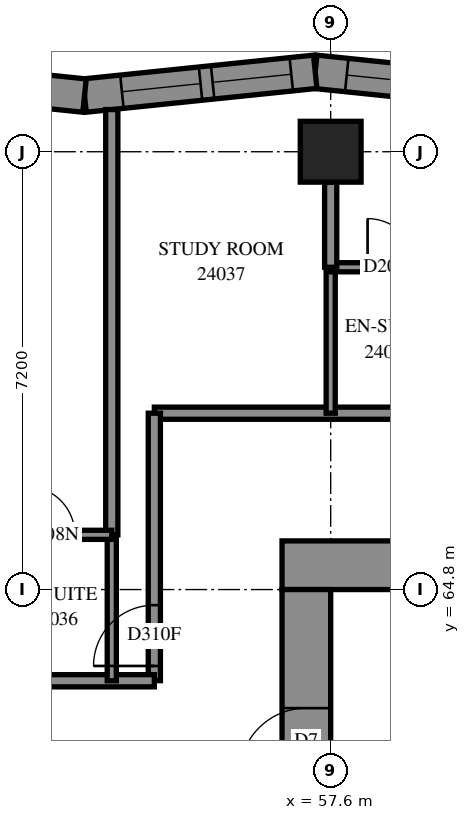
"""IFC4 building model, lengths in metres.
Left out: names, types, materials, properties, quantities, classifications, styles, units other than length and angle.
Written with IfcOpenShell. Run it as: python <this file> out.ifc"""

import sys

from ifc_helpers import new_model, si_unit, direction, frame, frame_2d, origin, origin_2d, place, context, subcontext, project, spatial, polyline, rectangle, outline, extrude, element, fill, save


model = new_model("IFC4")
c1 = context("Model", 3, precision=1e-05, world=origin(), true_north=direction((0.0, 1.0)))
c2 = subcontext(c1, "Body", "Model", "MODEL_VIEW")
j1 = project(units=[si_unit("LENGTHUNIT", "METRE"), si_unit("PLANEANGLEUNIT", "RADIAN")], contexts=[c1])
p1 = place(None, origin())
s1 = spatial("IfcSite", under=j1, at=p1, CompositionType="ELEMENT")
p2 = place(p1, origin())
s2 = spatial("IfcBuilding", under=s1, at=p2, CompositionType="ELEMENT")
p3 = place(p2, frame((0.0, 0.0, 91.4)))
s3 = spatial("IfcBuildingStorey", under=s2, at=p3, CompositionType="ELEMENT", Elevation=91.4)
p4 = place(p3, frame((57.6, 72.0, 0.0), z_axis=(0.0, 0.0, 1.0), x_axis=(1.0, 0.0, 0.0)))
e1 = element("IfcColumn", 1, at=p4, inside=s3, PredefinedType="COLUMN", context=c2, shape_type="SweptSolid", body=[
    extrude(rectangle(XDim=1.0, YDim=1.0, at=origin_2d()), origin(), (0.0, 0.0, 1.0), 3.1),
])
p5 = place(p3, frame((56.8, 65.2, -0.3), z_axis=(0.0, 0.0, 1.0), x_axis=(1.0, 0.0, 0.0)))
e2 = element("IfcWall", 2, at=p5, inside=s3, PredefinedType="SHEAR", context=c2, shape_type="SweptSolid", body=[
    extrude(rectangle(XDim=16.0, YDim=0.8, at=frame_2d((8.0, 0.0))), origin(), (0.0, 0.0, 1.0), 2.7),
])
p6 = place(p5, frame((10.8, 0.0, 0.3)))
e3 = element("IfcOpeningElement", 3, at=p6, cuts=e2, PredefinedType="OPENING", context=c2, shape_type="SweptSolid", body=[
    extrude(rectangle(XDim=0.8, YDim=2.1, at=frame_2d((0.4, 1.05))), frame((0.0, 0.41, 0.0), z_axis=(0.0, -1.0, 0.0), x_axis=(1.0, 0.0, 0.0)), (0.0, 0.0, 1.0), 0.82),
])
p7 = place(p3, frame((57.2, 50.4, -0.3), z_axis=(0.0, 0.0, 1.0), x_axis=(0.0, 1.0, 0.0)))
e4 = element("IfcWall", 4, at=p7, inside=s3, PredefinedType="SHEAR", context=c2, shape_type="SweptSolid", body=[
    extrude(rectangle(XDim=14.4, YDim=0.8, at=frame_2d((7.2, 0.0))), origin(), (0.0, 0.0, 1.0), 2.7),
])
p8 = place(p7, frame((4.55, 0.0, 0.3)))
e5 = element("IfcOpeningElement", 5, at=p8, cuts=e4, PredefinedType="OPENING", context=c2, shape_type="SweptSolid", body=[
    extrude(rectangle(XDim=1.1, YDim=2.1, at=frame_2d((0.55, 1.05))), frame((0.0, 0.41, 0.0), z_axis=(0.0, -1.0, 0.0), x_axis=(1.0, 0.0, 0.0)), (0.0, 0.0, 1.0), 0.82),
])
p9 = place(p7, frame((11.35, 0.0, 0.3)))
e6 = element("IfcOpeningElement", 6, at=p9, cuts=e4, PredefinedType="OPENING", context=c2, shape_type="SweptSolid", body=[
    extrude(rectangle(XDim=1.1, YDim=2.1, at=frame_2d((0.55, 1.05))), frame((0.0, 0.41, 0.0), z_axis=(0.0, -1.0, 0.0), x_axis=(1.0, 0.0, 0.0)), (0.0, 0.0, 1.0), 0.82),
])
p10 = place(p3, frame((61.139, 72.924, 0.0), z_axis=(0.0, 0.0, 1.0), x_axis=(-0.9947306832, 0.1025225234, 0.0)))
e7 = element("IfcWall", 7, at=p10, inside=s3, PredefinedType="SOLIDWALL", context=c2, shape_type="SweptSolid", body=[
    extrude(outline(polyline([(0.028, -0.275), (3.842, -0.275), (3.785, 0.275), (-0.028, 0.275), (0.028, -0.275)])), origin(), (0.0, 0.0, 1.0), 3.1),
])
p11 = place(p10, frame((0.493, 0.0, 0.5)))
e8 = element("IfcOpeningElement", 8, at=p11, cuts=e7, PredefinedType="OPENING", context=c2, shape_type="SweptSolid", body=[
    extrude(rectangle(XDim=1.3, YDim=2.45, at=frame_2d((0.65, 1.225))), frame((0.0, 0.285, 0.0), z_axis=(0.0, -1.0, 0.0), x_axis=(1.0, 0.0, 0.0)), (0.0, 0.0, 1.0), 0.57),
])
p12 = place(p10, frame((1.993, 0.0, 0.5)))
e9 = element("IfcOpeningElement", 9, at=p12, cuts=e7, PredefinedType="OPENING", context=c2, shape_type="SweptSolid", body=[
    extrude(rectangle(XDim=1.3, YDim=2.45, at=frame_2d((0.65, 1.225))), frame((0.0, 0.285, 0.0), z_axis=(0.0, -1.0, 0.0), x_axis=(1.0, 0.0, 0.0)), (0.0, 0.0, 1.0), 0.57),
])
p13 = place(p3, frame((57.346, 73.314, 0.0), z_axis=(0.0, 0.0, 1.0), x_axis=(-0.9947304076, -0.1025251975, 0.0)))
e10 = element("IfcWall", 10, at=p13, inside=s3, PredefinedType="SOLIDWALL", context=c2, shape_type="SweptSolid", body=[
    extrude(outline(polyline([(-0.028, -0.275), (3.785, -0.275), (3.842, 0.275), (0.028, 0.275), (-0.028, -0.275)])), origin(), (0.0, 0.0, 1.0), 3.1),
])
p14 = place(p13, frame((0.396, 0.0, 0.5)))
e11 = element("IfcOpeningElement", 11, at=p14, cuts=e10, PredefinedType="OPENING", context=c2, shape_type="SweptSolid", body=[
    extrude(rectangle(XDim=1.3, YDim=2.45, at=frame_2d((0.65, 1.225))), frame((0.0, 0.285, 0.0), z_axis=(0.0, -1.0, 0.0), x_axis=(1.0, 0.0, 0.0)), (0.0, 0.0, 1.0), 0.57),
])
p15 = place(p13, frame((1.896, 0.0, 0.5)))
e12 = element("IfcOpeningElement", 12, at=p15, cuts=e10, PredefinedType="OPENING", context=c2, shape_type="SweptSolid", body=[
    extrude(rectangle(XDim=1.3, YDim=2.45, at=frame_2d((0.65, 1.225))), frame((0.0, 0.285, 0.0), z_axis=(0.0, -1.0, 0.0), x_axis=(1.0, 0.0, 0.0)), (0.0, 0.0, 1.0), 0.57),
])
p16 = place(p3, frame((53.552, 72.924, 0.0), z_axis=(0.0, 0.0, 1.0), x_axis=(-0.9947306832, 0.1025225234, 0.0)))
e13 = element("IfcWall", 13, at=p16, inside=s3, PredefinedType="SOLIDWALL", context=c2, shape_type="SweptSolid", body=[
    extrude(outline(polyline([(0.028, -0.275), (3.842, -0.275), (3.785, 0.275), (-0.028, 0.275), (0.028, -0.275)])), origin(), (0.0, 0.0, 1.0), 3.1),
])
p17 = place(p16, frame((1.084, 0.0, 0.5)))
e14 = element("IfcOpeningElement", 14, at=p17, cuts=e13, PredefinedType="OPENING", context=c2, shape_type="SweptSolid", body=[
    extrude(rectangle(XDim=1.2, YDim=2.45, at=frame_2d((0.6, 1.225))), frame((0.0, 0.285, 0.0), z_axis=(0.0, -1.0, 0.0), x_axis=(1.0, 0.0, 0.0)), (0.0, 0.0, 1.0), 0.57),
])
p18 = place(p3, frame((54.7, 67.7, 0.0), z_axis=(0.0, 0.0, 1.0), x_axis=(1.0, 0.0, 0.0)))
e15 = element("IfcWall", 15, at=p18, inside=s3, PredefinedType="PARTITIONING", context=c2, shape_type="SweptSolid", body=[
    extrude(rectangle(XDim=20.2, YDim=0.2, at=frame_2d((10.1, 0.0))), origin(), (0.0, 0.0, 1.0), 3.1),
])
p19 = place(p18, frame((5.25, 0.0, 0.0)))
e16 = element("IfcOpeningElement", 16, at=p19, cuts=e15, PredefinedType="OPENING", context=c2, shape_type="SweptSolid", body=[
    extrude(rectangle(XDim=0.9, YDim=2.1, at=frame_2d((0.45, 1.05))), frame((0.0, 0.11, 0.0), z_axis=(0.0, -1.0, 0.0), x_axis=(1.0, 0.0, 0.0)), (0.0, 0.0, 1.0), 0.22),
])
p20 = place(p18, frame((6.9, 0.0, 0.0)))
e17 = element("IfcOpeningElement", 17, at=p20, cuts=e15, PredefinedType="OPENING", context=c2, shape_type="SweptSolid", body=[
    extrude(rectangle(XDim=0.9, YDim=2.1, at=frame_2d((0.45, 1.05))), frame((0.0, 0.11, 0.0), z_axis=(0.0, -1.0, 0.0), x_axis=(1.0, 0.0, 0.0)), (0.0, 0.0, 1.0), 0.22),
])
p21 = place(p18, frame((12.45, 0.0, 0.0)))
e18 = element("IfcOpeningElement", 18, at=p21, cuts=e15, PredefinedType="OPENING", context=c2, shape_type="SweptSolid", body=[
    extrude(rectangle(XDim=0.9, YDim=2.1, at=frame_2d((0.45, 1.05))), frame((0.0, 0.11, 0.0), z_axis=(0.0, -1.0, 0.0), x_axis=(1.0, 0.0, 0.0)), (0.0, 0.0, 1.0), 0.22),
])
p22 = place(p18, frame((14.1, 0.0, 0.0)))
e19 = element("IfcOpeningElement", 19, at=p22, cuts=e15, PredefinedType="OPENING", context=c2, shape_type="SweptSolid", body=[
    extrude(rectangle(XDim=0.9, YDim=2.1, at=frame_2d((0.45, 1.05))), frame((0.0, 0.11, 0.0), z_axis=(0.0, -1.0, 0.0), x_axis=(1.0, 0.0, 0.0)), (0.0, 0.0, 1.0), 0.22),
])
p23 = place(p3, frame((54.0, 65.7, 0.0), z_axis=(0.0, 0.0, 1.0), x_axis=(0.0, 1.0, 0.0)))
e20 = element("IfcWall", 20, at=p23, inside=s3, PredefinedType="PARTITIONING", context=c2, shape_type="SweptSolid", body=[
    extrude(rectangle(XDim=6.993, YDim=0.2, at=frame_2d((3.497, 0.0))), origin(), (0.0, 0.0, 1.0), 3.1),
])
p24 = place(p3, frame((54.7, 63.302, 0.0), z_axis=(0.0, 0.0, 1.0), x_axis=(0.0, 1.0, 0.0)))
e21 = element("IfcWall", 21, at=p24, inside=s3, PredefinedType="PARTITIONING", context=c2, shape_type="SweptSolid", body=[
    extrude(rectangle(XDim=4.398, YDim=0.2, at=frame_2d((2.199, 0.0))), origin(), (0.0, 0.0, 1.0), 3.1),
])
p25 = place(p24, frame((0.242, 0.0, 0.0)))
e22 = element("IfcOpeningElement", 22, at=p25, cuts=e21, PredefinedType="OPENING", context=c2, shape_type="SweptSolid", body=[
    extrude(rectangle(XDim=1.0, YDim=2.1, at=frame_2d((0.5, 1.05))), frame((0.0, 0.11, 0.0), z_axis=(0.0, -1.0, 0.0), x_axis=(1.0, 0.0, 0.0)), (0.0, 0.0, 1.0), 0.22),
])
p26 = place(p3, frame((50.4, 63.3, 0.0), z_axis=(0.0, 0.0, 1.0), x_axis=(1.0, 0.0, 0.0)))
e23 = element("IfcWall", 23, at=p26, inside=s3, PredefinedType="PARTITIONING", context=c2, shape_type="SweptSolid", body=[
    extrude(rectangle(XDim=4.3, YDim=0.2, at=frame_2d((2.15, 0.0))), origin(), (0.0, 0.0, 1.0), 3.1),
])
p27 = place(p26, frame((0.552, 0.0, 0.0)))
e24 = element("IfcOpeningElement", 24, at=p27, cuts=e23, PredefinedType="OPENING", context=c2, shape_type="SweptSolid", body=[
    extrude(rectangle(XDim=0.9, YDim=2.1, at=frame_2d((0.45, 1.05))), frame((0.0, 0.11, 0.0), z_axis=(0.0, -1.0, 0.0), x_axis=(1.0, 0.0, 0.0)), (0.0, 0.0, 1.0), 0.22),
])
for number, where, z_axis, x_axis in (
    (25, (54.0, 63.3, 0.0), (0.0, 0.0, 1.0), (0.0, 1.0, 0.0)),
    (26, (57.6, 67.7, 0.0), (0.0, 0.0, 1.0), (0.0, 1.0, 0.0)),
):
    element("IfcWall", number, at=place(p3, frame(where, z_axis=z_axis, x_axis=x_axis)), inside=s3, PredefinedType="PARTITIONING", context=c2, shape_type="SweptSolid", body=[
        extrude(rectangle(XDim=2.4, YDim=0.15, at=frame_2d((1.2, 0.0))), origin(), (0.0, 0.0, 1.0), 3.1),
    ])
p28 = place(p3, frame((52.1, 65.7, 0.0), z_axis=(0.0, 0.0, 1.0), x_axis=(1.0, 0.0, 0.0)))
e27 = element("IfcWall", 27, at=p28, inside=s3, PredefinedType="PARTITIONING", context=c2, shape_type="SweptSolid", body=[
    extrude(rectangle(XDim=1.9, YDim=0.15, at=frame_2d((0.95, 0.0))), origin(), (0.0, 0.0, 1.0), 3.1),
])
p29 = place(p28, frame((0.493, 0.0, 0.0)))
e28 = element("IfcOpeningElement", 28, at=p29, cuts=e27, PredefinedType="OPENING", context=c2, shape_type="SweptSolid", body=[
    extrude(rectangle(XDim=0.8, YDim=2.1, at=frame_2d((0.4, 1.05))), frame((0.0, 0.085, 0.0), z_axis=(0.0, -1.0, 0.0), x_axis=(1.0, 0.0, 0.0)), (0.0, 0.0, 1.0), 0.17),
])
p30 = place(p3, frame((57.6, 70.1, 0.0), z_axis=(0.0, 0.0, 1.0), x_axis=(1.0, 0.0, 0.0)))
e29 = element("IfcWall", 29, at=p30, inside=s3, PredefinedType="PARTITIONING", context=c2, shape_type="SweptSolid", body=[
    extrude(rectangle(XDim=1.9, YDim=0.15, at=frame_2d((0.95, 0.0))), origin(), (0.0, 0.0, 1.0), 3.1),
])
p31 = place(p30, frame((0.607, 0.0, 0.0)))
e30 = element("IfcOpeningElement", 30, at=p31, cuts=e29, PredefinedType="OPENING", context=c2, shape_type="SweptSolid", body=[
    extrude(rectangle(XDim=0.8, YDim=2.1, at=frame_2d((0.4, 1.05))), frame((0.0, 0.085, 0.0), z_axis=(0.0, -1.0, 0.0), x_axis=(1.0, 0.0, 0.0)), (0.0, 0.0, 1.0), 0.17),
])
p32 = place(p3, frame((57.6, 70.1, 0.0), z_axis=(0.0, 0.0, 1.0), x_axis=(0.0, 1.0, 0.0)))
e31 = element("IfcWall", 31, at=p32, inside=s3, PredefinedType="PARTITIONING", context=c2, shape_type="SweptSolid", body=[
    extrude(rectangle(XDim=1.4, YDim=0.2, at=frame_2d((0.7, 0.0))), origin(), (0.0, 0.0, 1.0), 3.1),
])
p33 = place(p12, origin())
e32 = element("IfcWindow", 32, at=p33, inside=s3, PartitioningType="SINGLE_PANEL", PredefinedType="WINDOW", context=c2, shape_type="SweptSolid", body=[
    extrude(rectangle(XDim=1.3, YDim=2.45, at=frame_2d((0.65, 1.225))), frame((0.0, 0.155, 0.0), z_axis=(0.0, -1.0, 0.0), x_axis=(1.0, 0.0, 0.0)), (0.0, 0.0, 1.0), 0.06),
])
fill(e9, e32)
p34 = place(p14, origin())
e33 = element("IfcWindow", 33, at=p34, inside=s3, PartitioningType="SINGLE_PANEL", PredefinedType="WINDOW", context=c2, shape_type="SweptSolid", body=[
    extrude(rectangle(XDim=1.3, YDim=2.45, at=frame_2d((0.65, 1.225))), frame((0.0, 0.155, 0.0), z_axis=(0.0, -1.0, 0.0), x_axis=(1.0, 0.0, 0.0)), (0.0, 0.0, 1.0), 0.06),
])
fill(e11, e33)
p35 = place(p15, origin())
e34 = element("IfcWindow", 34, at=p35, inside=s3, PartitioningType="SINGLE_PANEL", PredefinedType="WINDOW", context=c2, shape_type="SweptSolid", body=[
    extrude(rectangle(XDim=1.3, YDim=2.45, at=frame_2d((0.65, 1.225))), frame((0.0, 0.155, 0.0), z_axis=(0.0, -1.0, 0.0), x_axis=(1.0, 0.0, 0.0)), (0.0, 0.0, 1.0), 0.06),
])
fill(e12, e34)
p36 = place(p9, origin())
e35 = element("IfcDoor", 35, at=p36, inside=s3, OperationType="SINGLE_SWING_LEFT", PredefinedType="DOOR", context=c2, shape_type="SweptSolid", body=[
    extrude(rectangle(XDim=1.1, YDim=2.1, at=frame_2d((0.55, 1.05))), frame((0.0, 0.025, 0.0), z_axis=(0.0, -1.0, 0.0), x_axis=(1.0, 0.0, 0.0)), (0.0, 0.0, 1.0), 0.05),
])
fill(e6, e35)
p37 = place(p29, origin())
e36 = element("IfcDoor", 36, at=p37, inside=s3, OperationType="SINGLE_SWING_RIGHT", PredefinedType="DOOR", context=c2, shape_type="SweptSolid", body=[
    extrude(rectangle(XDim=0.8, YDim=2.1, at=frame_2d((0.4, 1.05))), frame((0.0, 0.025, 0.0), z_axis=(0.0, -1.0, 0.0), x_axis=(1.0, 0.0, 0.0)), (0.0, 0.0, 1.0), 0.05),
])
fill(e28, e36)
p38 = place(p25, origin())
e37 = element("IfcDoor", 37, at=p38, inside=s3, OperationType="SINGLE_SWING_LEFT", PredefinedType="DOOR", context=c2, shape_type="SweptSolid", body=[
    extrude(rectangle(XDim=1.0, YDim=2.1, at=frame_2d((0.5, 1.05))), frame((0.0, 0.025, 0.0), z_axis=(0.0, -1.0, 0.0), x_axis=(1.0, 0.0, 0.0)), (0.0, 0.0, 1.0), 0.05),
])
fill(e22, e37)
p39 = place(p31, origin())
e38 = element("IfcDoor", 38, at=p39, inside=s3, OperationType="SINGLE_SWING_RIGHT", PredefinedType="DOOR", context=c2, shape_type="SweptSolid", body=[
    extrude(rectangle(XDim=0.8, YDim=2.1, at=frame_2d((0.4, 1.05))), frame((0.0, 0.025, 0.0), z_axis=(0.0, -1.0, 0.0), x_axis=(1.0, 0.0, 0.0)), (0.0, 0.0, 1.0), 0.05),
])
fill(e30, e38)
save(model, sys.argv[1])
